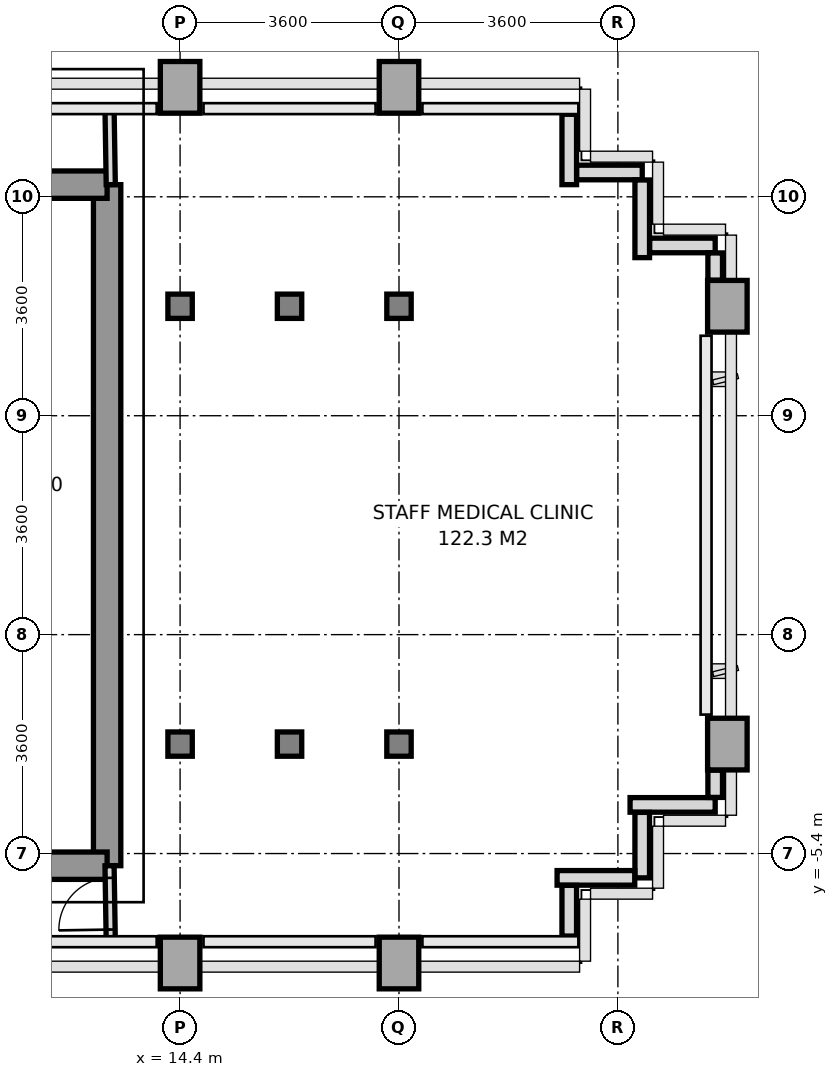
"""IFC4 building model, lengths in metres.
Left out: names, types, materials, properties, quantities, classifications, styles, units other than length and angle.
Written with IfcOpenShell. Run it as: python <this file> out.ifc"""

import sys

from ifc_helpers import new_model, si_unit, direction, frame, frame_2d, origin, origin_2d, place, context, subcontext, project, spatial, rectangle, i_section, extrude, source, transform, mapped, element, fill, save


model = new_model("IFC4")
c1 = context("Model", 3, precision=1e-05, world=origin(), true_north=direction((0.0, 1.0)))
c2 = subcontext(c1, "Body", "Model", "MODEL_VIEW")
j1 = project(units=[si_unit("LENGTHUNIT", "METRE"), si_unit("PLANEANGLEUNIT", "RADIAN")], contexts=[c1])
p1 = place(None, origin())
s1 = spatial("IfcSite", under=j1, at=p1, CompositionType="ELEMENT")
p2 = place(p1, origin())
s2 = spatial("IfcBuilding", under=s1, at=p2, CompositionType="ELEMENT")
p3 = place(p2, frame((0.0, 0.0, 141.4)))
s3 = spatial("IfcBuildingStorey", under=s2, at=p3, CompositionType="ELEMENT", Elevation=141.4)
m1 = source(origin(), c2, "Body", "SweptSolid", [
    extrude(rectangle(XDim=0.65, YDim=0.85, at=origin_2d()), origin(), (0.0, 0.0, 1.0), 3.2),
])
p4 = place(p3, frame((14.4, -7.2, 0.0), z_axis=(0.0, 0.0, 1.0), x_axis=(1.0, 0.0, 0.0)))
e1 = element("IfcColumn", 1, at=p4, inside=s3, PredefinedType="COLUMN", context=c2, shape_type="MappedRepresentation", body=[
    mapped(m1, transform((0.0, 0.0, 0.0), x_axis=(1.0, 0.0, 0.0), y_axis=(0.0, 1.0, 0.0), z_axis=(0.0, 0.0, 1.0), scale=1.0)),
])
m2 = source(origin(), c2, "Body", "SweptSolid", [
    extrude(i_section(OverallWidth=0.401, OverallDepth=0.399, WebThickness=0.02, FlangeThickness=0.032, at=origin_2d()), origin(), (0.0, 0.0, 1.0), 3.2),
])
for number, where, z_axis, x_axis in (
    (2, (14.4, -3.6, 0.0), (0.0, 0.0, 1.0), (1.0, 0.0, 0.0)),
    (3, (14.4, 3.6, 0.0), (0.0, 0.0, 1.0), (1.0, 0.0, 0.0)),
):
    element("IfcColumn", number, at=place(p3, frame(where, z_axis=z_axis, x_axis=x_axis)), inside=s3, PredefinedType="COLUMN", context=c2, shape_type="MappedRepresentation", body=[
        mapped(m2, transform((0.0, 0.0, 0.0), x_axis=(1.0, 0.0, 0.0), y_axis=(0.0, 1.0, 0.0), z_axis=(0.0, 0.0, 1.0), scale=1.0)),
    ])
p5 = place(p3, frame((14.4, 7.2, 0.0), z_axis=(0.0, 0.0, 1.0), x_axis=(1.0, 0.0, 0.0)))
e4 = element("IfcColumn", 4, at=p5, inside=s3, PredefinedType="COLUMN", context=c2, shape_type="MappedRepresentation", body=[
    mapped(m1, transform((0.0, 0.0, 0.0), x_axis=(1.0, 0.0, 0.0), y_axis=(0.0, 1.0, 0.0), z_axis=(0.0, 0.0, 1.0), scale=1.0)),
])
for number, where, z_axis, x_axis in (
    (5, (16.2, -3.6, 0.0), (0.0, 0.0, 1.0), (1.0, 0.0, 0.0)),
    (6, (16.2, 3.6, 0.0), (0.0, 0.0, 1.0), (1.0, 0.0, 0.0)),
):
    element("IfcColumn", number, at=place(p3, frame(where, z_axis=z_axis, x_axis=x_axis)), inside=s3, PredefinedType="COLUMN", context=c2, shape_type="MappedRepresentation", body=[
        mapped(m2, transform((0.0, 0.0, 0.0), x_axis=(1.0, 0.0, 0.0), y_axis=(0.0, 1.0, 0.0), z_axis=(0.0, 0.0, 1.0), scale=1.0)),
    ])
p6 = place(p3, frame((18.0, -7.2, 0.0), z_axis=(0.0, 0.0, 1.0), x_axis=(1.0, 0.0, 0.0)))
e7 = element("IfcColumn", 7, at=p6, inside=s3, PredefinedType="COLUMN", context=c2, shape_type="MappedRepresentation", body=[
    mapped(m1, transform((0.0, 0.0, 0.0), x_axis=(1.0, 0.0, 0.0), y_axis=(0.0, 1.0, 0.0), z_axis=(0.0, 0.0, 1.0), scale=1.0)),
])
for number, where, z_axis, x_axis in (
    (8, (18.0, -3.6, 0.0), (0.0, 0.0, 1.0), (1.0, 0.0, 0.0)),
    (9, (18.0, 3.6, 0.0), (0.0, 0.0, 1.0), (1.0, 0.0, 0.0)),
):
    element("IfcColumn", number, at=place(p3, frame(where, z_axis=z_axis, x_axis=x_axis)), inside=s3, PredefinedType="COLUMN", context=c2, shape_type="MappedRepresentation", body=[
        mapped(m2, transform((0.0, 0.0, 0.0), x_axis=(1.0, 0.0, 0.0), y_axis=(0.0, 1.0, 0.0), z_axis=(0.0, 0.0, 1.0), scale=1.0)),
    ])
for number, where, z_axis, x_axis in (
    (10, (18.0, 7.2, 0.0), (0.0, 0.0, 1.0), (1.0, 0.0, 0.0)),
    (11, (23.4, -3.6, 0.0), (0.0, 0.0, 1.0), (1.0, 0.0, 0.0)),
    (12, (23.4, 3.6, 0.0), (0.0, 0.0, 1.0), (1.0, 0.0, 0.0)),
):
    element("IfcColumn", number, at=place(p3, frame(where, z_axis=z_axis, x_axis=x_axis)), inside=s3, PredefinedType="COLUMN", context=c2, shape_type="MappedRepresentation", body=[
        mapped(m1, transform((0.0, 0.0, 0.0), x_axis=(1.0, 0.0, 0.0), y_axis=(0.0, 1.0, 0.0), z_axis=(0.0, 0.0, 1.0), scale=1.0)),
    ])
p7 = place(p3, frame((23.2, -4.6, 0.0), z_axis=(0.0, 0.0, 1.0), x_axis=(-1.0, 0.0, 0.0)))
e13 = element("IfcWall", 13, at=p7, inside=s3, PredefinedType="PARAPET", context=c2, shape_type="SweptSolid", body=[
    extrude(rectangle(XDim=1.4, YDim=0.24, at=frame_2d((0.7, 0.0))), origin(), (0.0, 0.0, 1.0), 1.15),
])
p8 = place(p3, frame((22.0, -4.723, 0.0), z_axis=(0.0, 0.0, 1.0), x_axis=(0.0, -1.0, 0.0)))
e14 = element("IfcWall", 14, at=p8, inside=s3, PredefinedType="PARAPET", context=c2, shape_type="SweptSolid", body=[
    extrude(rectangle(XDim=1.077, YDim=0.24, at=frame_2d((0.539, 0.0))), origin(), (0.0, 0.0, 1.0), 1.15),
])
p9 = place(p3, frame((21.877, -5.8, 0.0), z_axis=(0.0, 0.0, 1.0), x_axis=(-1.0, 0.0, 0.0)))
e15 = element("IfcWall", 15, at=p9, inside=s3, PredefinedType="PARAPET", context=c2, shape_type="SweptSolid", body=[
    extrude(rectangle(XDim=1.277, YDim=0.24, at=frame_2d((0.638, 0.0))), origin(), (0.0, 0.0, 1.0), 1.15),
])
p10 = place(p3, frame((20.8, -5.923, 0.0), z_axis=(0.0, 0.0, 1.0), x_axis=(0.0, -1.0, 0.0)))
e16 = element("IfcWall", 16, at=p10, inside=s3, PredefinedType="PARAPET", context=c2, shape_type="SweptSolid", body=[
    extrude(rectangle(XDim=0.834, YDim=0.24, at=frame_2d((0.417, 0.0))), origin(), (0.0, 0.0, 1.0), 1.15),
])
p11 = place(p3, frame((20.8, 6.757, 0.0), z_axis=(0.0, 0.0, 1.0), x_axis=(0.0, -1.0, 0.0)))
e17 = element("IfcWall", 17, at=p11, inside=s3, PredefinedType="PARAPET", context=c2, shape_type="SweptSolid", body=[
    extrude(rectangle(XDim=1.157, YDim=0.24, at=frame_2d((0.579, 0.0))), origin(), (0.0, 0.0, 1.0), 1.15),
])
p12 = place(p3, frame((20.923, 5.8, 0.0), z_axis=(0.0, 0.0, 1.0), x_axis=(1.0, 0.0, 0.0)))
e18 = element("IfcWall", 18, at=p12, inside=s3, PredefinedType="PARAPET", context=c2, shape_type="SweptSolid", body=[
    extrude(rectangle(XDim=1.077, YDim=0.24, at=frame_2d((0.539, 0.0))), origin(), (0.0, 0.0, 1.0), 1.15),
])
p13 = place(p3, frame((22.0, 5.677, 0.0), z_axis=(0.0, 0.0, 1.0), x_axis=(0.0, -1.0, 0.0)))
e19 = element("IfcWall", 19, at=p13, inside=s3, PredefinedType="PARAPET", context=c2, shape_type="SweptSolid", body=[
    extrude(rectangle(XDim=1.277, YDim=0.24, at=frame_2d((0.639, 0.0))), origin(), (0.0, 0.0, 1.0), 1.15),
])
p14 = place(p3, frame((22.123, 4.6, 0.0), z_axis=(0.0, 0.0, 1.0), x_axis=(1.0, 0.0, 0.0)))
e20 = element("IfcWall", 20, at=p14, inside=s3, PredefinedType="PARAPET", context=c2, shape_type="SweptSolid", body=[
    extrude(rectangle(XDim=1.077, YDim=0.24, at=frame_2d((0.539, 0.0))), origin(), (0.0, 0.0, 1.0), 1.15),
])
for number, where, z_axis, x_axis in (
    (21, (23.2, 4.477, 0.0), (0.0, 0.0, 1.0), (0.0, -1.0, 0.0)),
    (22, (23.2, -4.028, 0.0), (0.0, 0.0, 1.0), (0.0, -1.0, 0.0)),
):
    element("IfcWall", number, at=place(p3, frame(where, z_axis=z_axis, x_axis=x_axis)), inside=s3, PredefinedType="PARAPET", context=c2, shape_type="SweptSolid", body=[
        extrude(rectangle(XDim=0.449, YDim=0.24, at=frame_2d((0.225, 0.0))), origin(), (0.0, 0.0, 1.0), 1.15),
    ])
p15 = place(p3, frame((13.2, -5.6, 0.0), z_axis=(0.0, 0.0, 1.0), x_axis=(0.0, 1.0, 0.0)))
e23 = element("IfcWall", 23, at=p15, inside=s3, PredefinedType="SHEAR", context=c2, shape_type="SweptSolid", body=[
    extrude(rectangle(XDim=11.2, YDim=0.45, at=frame_2d((5.6, 0.0))), origin(), (0.0, 0.0, 1.0), 3.2),
])
p16 = place(p3, frame((11.381, 5.6, 0.0), z_axis=(0.0, 0.0, 1.0), x_axis=(1.0, 0.0, 0.0)))
e24 = element("IfcWall", 24, at=p16, inside=s3, PredefinedType="SHEAR", context=c2, shape_type="SweptSolid", body=[
    extrude(rectangle(XDim=1.819, YDim=0.45, at=frame_2d((0.909, 0.0))), origin(), (0.0, 0.0, 1.0), 3.2),
])
p17 = place(p3, frame((5.4, -5.6, 0.0), z_axis=(0.0, 0.0, 1.0), x_axis=(1.0, 0.0, 0.0)))
e25 = element("IfcWall", 25, at=p17, inside=s3, PredefinedType="SHEAR", context=c2, shape_type="SweptSolid", body=[
    extrude(rectangle(XDim=7.8, YDim=0.45, at=frame_2d((3.9, 0.0))), origin(), (0.0, 0.0, 1.0), 3.2),
])
p18 = place(p17, frame((3.0, 0.0, 0.0)))
e26 = element("IfcOpeningElement", 26, at=p18, cuts=e25, PredefinedType="OPENING", context=c2, shape_type="SweptSolid", body=[
    extrude(rectangle(XDim=1.2, YDim=2.2, at=frame_2d((0.6, 1.1))), frame((0.0, 0.235, 0.0), z_axis=(0.0, -1.0, 0.0), x_axis=(1.0, 0.0, 0.0)), (0.0, 0.0, 1.0), 0.47),
])
p19 = place(p3, frame((13.26, 5.6, 0.0), z_axis=(0.0, 0.0, 1.0), x_axis=(-0.016013571389, 0.999871774545, 0.0)))
e27 = element("IfcWall", 27, at=p19, inside=s3, PredefinedType="PARTITIONING", context=c2, shape_type="SweptSolid", body=[
    extrude(rectangle(XDim=1.25, YDim=0.15, at=frame_2d((0.625, 0.0))), origin(), (0.0, 0.0, 1.0), 3.2),
])
p20 = place(p3, frame((13.26, -6.85, 0.0), z_axis=(0.0, 0.0, 1.0), x_axis=(-0.016013571389, 0.999871774545, 0.0)))
e28 = element("IfcWall", 28, at=p20, inside=s3, PredefinedType="PARTITIONING", context=c2, shape_type="SweptSolid", body=[
    extrude(rectangle(XDim=1.25, YDim=0.15, at=frame_2d((0.625, 0.0))), origin(), (0.0, 0.0, 1.0), 3.2),
])
p21 = place(p20, frame((0.2, 0.0, 0.0)))
e29 = element("IfcOpeningElement", 29, at=p21, cuts=e28, PredefinedType="OPENING", context=c2, shape_type="SweptSolid", body=[
    extrude(rectangle(XDim=0.85, YDim=2.1, at=frame_2d((0.425, 1.05))), frame((0.0, 0.085, 0.0), z_axis=(0.0, -1.0, 0.0), x_axis=(1.0, 0.0, 0.0)), (0.0, 0.0, 1.0), 0.17),
])
m3 = source(origin(), c2, "Body", "SweptSolid", [
    extrude(rectangle(XDim=0.85, YDim=2.1, at=frame_2d((0.425, 1.05))), frame((0.0, 0.025, 0.0), z_axis=(0.0, -1.0, 0.0), x_axis=(1.0, 0.0, 0.0)), (0.0, 0.0, 1.0), 0.05),
])
p22 = place(p21, origin())
e30 = element("IfcDoor", 30, at=p22, inside=s3, OperationType="SINGLE_SWING_LEFT", PredefinedType="DOOR", context=c2, shape_type="MappedRepresentation", body=[
    mapped(m3, transform((0.0, 0.0, 0.0), x_axis=(1.0, 0.0, 0.0), y_axis=(0.0, 1.0, 0.0), z_axis=(0.0, 0.0, 1.0), scale=1.0)),
])
fill(e29, e30)
save(model, sys.argv[1])
